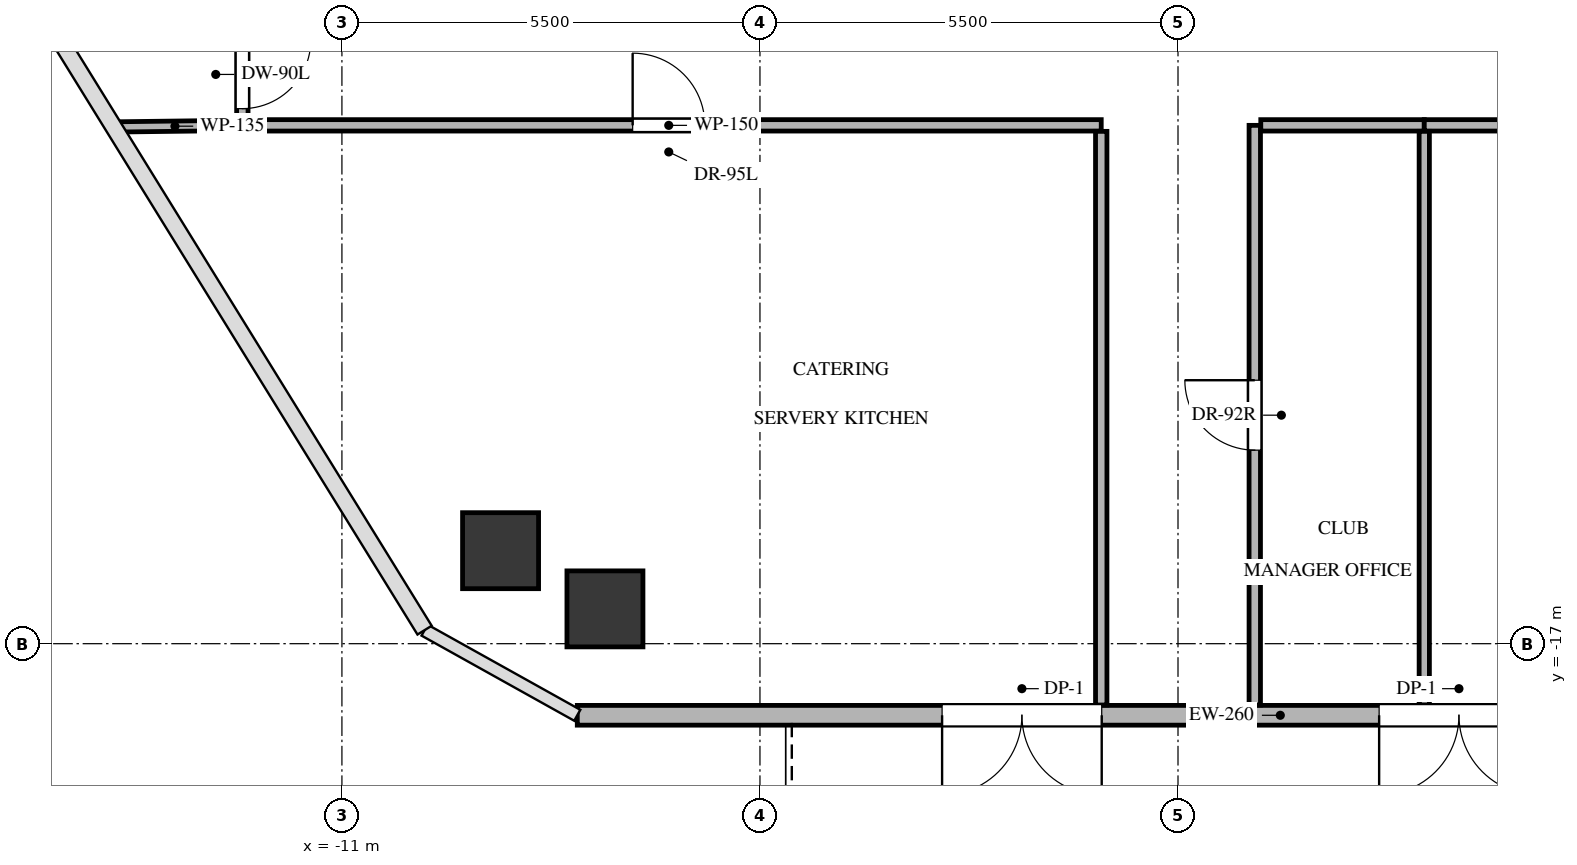
"""IFC4 building model, lengths in metres.
Left out: names, types, materials, properties, quantities, classifications, styles, units other than length and angle.
Written with IfcOpenShell. Run it as: python <this file> out.ifc"""

import sys

from ifc_helpers import new_model, si_unit, direction, frame, frame_2d, origin, origin_2d, place, context, subcontext, project, spatial, rectangle, extrude, source, transform, mapped, element, fill, save


model = new_model("IFC4")
c1 = context("Model", 3, precision=1e-05, world=origin(), true_north=direction((0.0, 1.0)))
c2 = subcontext(c1, "Body", "Model", "MODEL_VIEW")
j1 = project(units=[si_unit("LENGTHUNIT", "METRE"), si_unit("PLANEANGLEUNIT", "RADIAN")], contexts=[c1])
p1 = place(None, origin())
s1 = spatial("IfcSite", under=j1, at=p1, CompositionType="ELEMENT")
p2 = place(p1, origin())
s2 = spatial("IfcBuilding", under=s1, at=p2, CompositionType="ELEMENT")
p3 = place(p2, frame((0.0, 0.0, 162.6)))
s3 = spatial("IfcBuildingStorey", under=s2, at=p3, CompositionType="ELEMENT", Elevation=162.6)
m1 = source(origin(), c2, "Body", "SweptSolid", [
    extrude(rectangle(XDim=1.0, YDim=1.0, at=origin_2d()), origin(), (0.0, 0.0, 1.0), 4.68),
])
for number, where, z_axis, x_axis in (
    (1, (-8.913, -15.776, -0.32), (0.0, 0.0, 1.0), (1.0, 0.0, 0.0)),
    (2, (-7.54, -16.542, -0.32), (0.0, 0.0, 1.0), (1.0, 0.0, 0.0)),
):
    element("IfcColumn", number, at=place(p3, frame(where, z_axis=z_axis, x_axis=x_axis)), inside=s3, PredefinedType="COLUMN", context=c2, shape_type="MappedRepresentation", body=[
        mapped(m1, transform((0.0, 0.0, 0.0), x_axis=(1.0, 0.0, 0.0), y_axis=(0.0, 1.0, 0.0), z_axis=(0.0, 0.0, 1.0), scale=1.0)),
    ])
p4 = place(p3, frame((10.595, -17.942, 0.0), z_axis=(0.0, 0.0, 1.0), x_axis=(-1.0, 0.0, 0.0)))
e3 = element("IfcWall", 3, at=p4, inside=s3, PredefinedType="SOLIDWALL", context=c2, shape_type="SweptSolid", body=[
    extrude(rectangle(XDim=18.499, YDim=0.26, at=frame_2d((9.249, 0.0))), origin(), (0.0, 0.0, 1.0), 4.36),
])
p5 = place(p4, frame((5.849, 0.0, 0.0)))
e4 = element("IfcOpeningElement", 4, at=p5, cuts=e3, PredefinedType="OPENING", context=c2, shape_type="SweptSolid", body=[
    extrude(rectangle(XDim=2.1, YDim=2.4, at=frame_2d((1.05, 1.2))), frame((0.0, 0.14, 0.0), z_axis=(0.0, -1.0, 0.0), x_axis=(1.0, 0.0, 0.0)), (0.0, 0.0, 1.0), 0.28),
])
p6 = place(p4, frame((11.599, 0.0, 0.0)))
e5 = element("IfcOpeningElement", 5, at=p6, cuts=e3, PredefinedType="OPENING", context=c2, shape_type="SweptSolid", body=[
    extrude(rectangle(XDim=2.1, YDim=2.4, at=frame_2d((1.05, 1.2))), frame((0.0, 0.14, 0.0), z_axis=(0.0, -1.0, 0.0), x_axis=(1.0, 0.0, 0.0)), (0.0, 0.0, 1.0), 0.28),
])
p7 = place(p3, frame((-12.39, -10.18, 0.0), z_axis=(0.0, 0.0, 1.0), x_axis=(1.0, 0.0, 0.0)))
e6 = element("IfcWall", 6, at=p7, inside=s3, PredefinedType="PARTITIONING", context=c2, shape_type="SweptSolid", body=[
    extrude(rectangle(XDim=11.38, YDim=0.15, at=frame_2d((5.69, 0.0))), origin(), (0.0, 0.0, 1.0), 3.542),
])
p8 = place(p7, frame((5.215, 0.0, 0.0)))
e7 = element("IfcOpeningElement", 7, at=p8, cuts=e6, PredefinedType="OPENING", context=c2, shape_type="SweptSolid", body=[
    extrude(rectangle(XDim=0.95, YDim=2.1, at=frame_2d((0.475, 1.05))), frame((0.0, 0.085, 0.0), z_axis=(0.0, -1.0, 0.0), x_axis=(1.0, 0.0, 0.0)), (0.0, 0.0, 1.0), 0.17),
])
p9 = place(p3, frame((-1.01, -10.259, 0.0), z_axis=(0.0, 0.0, 1.0), x_axis=(0.0, -1.0, 0.0)))
e8 = element("IfcWall", 8, at=p9, inside=s3, PredefinedType="PARTITIONING", context=c2, shape_type="SweptSolid", body=[
    extrude(rectangle(XDim=7.548, YDim=0.15, at=frame_2d((3.774, 0.0))), origin(), (0.0, 0.0, 1.0), 3.699),
])
p10 = place(p3, frame((1.01, -17.807, 0.0), z_axis=(0.0, 0.0, 1.0), x_axis=(0.0, 1.0, 0.0)))
e9 = element("IfcWall", 9, at=p10, inside=s3, PredefinedType="PARTITIONING", context=c2, shape_type="SweptSolid", body=[
    extrude(rectangle(XDim=7.627, YDim=0.15, at=frame_2d((3.813, 0.0))), origin(), (0.0, 0.0, 1.0), 3.699),
])
p11 = place(p10, frame((3.354, 0.0, 0.0)))
e10 = element("IfcOpeningElement", 10, at=p11, cuts=e9, PredefinedType="OPENING", context=c2, shape_type="SweptSolid", body=[
    extrude(rectangle(XDim=0.92, YDim=2.1, at=frame_2d((0.46, 1.05))), frame((0.0, 0.085, 0.0), z_axis=(0.0, -1.0, 0.0), x_axis=(1.0, 0.0, 0.0)), (0.0, 0.0, 1.0), 0.17),
])
p12 = place(p3, frame((1.089, -10.18, 0.0), z_axis=(0.0, 0.0, 1.0), x_axis=(1.0, 0.0, 0.0)))
e11 = element("IfcWall", 11, at=p12, inside=s3, PredefinedType="PARTITIONING", context=c2, shape_type="SweptSolid", body=[
    extrude(rectangle(XDim=2.151, YDim=0.15, at=frame_2d((1.075, 0.0))), origin(), (0.0, 0.0, 1.0), 3.908),
])
p13 = place(p3, frame((3.24, -10.18, 0.0), z_axis=(0.0, 0.0, 1.0), x_axis=(1.0, 0.0, 0.0)))
e12 = element("IfcWall", 12, at=p13, inside=s3, PredefinedType="PARTITIONING", context=c2, shape_type="SweptSolid", body=[
    extrude(rectangle(XDim=9.02, YDim=0.15, at=frame_2d((4.51, 0.0))), origin(), (0.0, 0.0, 1.0), 3.542),
])
p14 = place(p13, frame((4.035, 0.0, 0.0)))
e13 = element("IfcOpeningElement", 13, at=p14, cuts=e12, PredefinedType="OPENING", context=c2, shape_type="SweptSolid", body=[
    extrude(rectangle(XDim=0.95, YDim=2.1, at=frame_2d((0.475, 1.05))), frame((0.0, 0.085, 0.0), z_axis=(0.0, -1.0, 0.0), x_axis=(1.0, 0.0, 0.0)), (0.0, 0.0, 1.0), 0.17),
])
p15 = place(p3, frame((-12.31, -8.919, 0.0), z_axis=(0.0, 0.0, 1.0), x_axis=(0.0, -1.0, 0.0)))
e14 = element("IfcWall", 14, at=p15, inside=s3, PredefinedType="PARTITIONING", context=c2, shape_type="SweptSolid", body=[
    extrude(rectangle(XDim=1.182, YDim=0.15, at=frame_2d((0.591, 0.0))), origin(), (0.0, 0.0, 1.0), 3.699),
])
p16 = place(p15, frame((0.141, 0.0, 0.0)))
e15 = element("IfcOpeningElement", 15, at=p16, cuts=e14, PredefinedType="OPENING", context=c2, shape_type="SweptSolid", body=[
    extrude(rectangle(XDim=0.9, YDim=2.05, at=frame_2d((0.45, 1.025))), frame((0.0, 0.085, 0.0), z_axis=(0.0, -1.0, 0.0), x_axis=(1.0, 0.0, 0.0)), (0.0, 0.0, 1.0), 0.17),
])
p17 = place(p3, frame((-14.004, -10.201, 0.0), z_axis=(0.0, 0.0, 1.0), x_axis=(0.999923084603, 0.012402615782, 0.0)))
e16 = element("IfcWall", 16, at=p17, inside=s3, PredefinedType="PARTITIONING", context=c2, shape_type="SweptSolid", body=[
    extrude(rectangle(XDim=1.614, YDim=0.135, at=frame_2d((0.807, 0.0))), origin(), (0.0, 0.0, 1.0), 3.699),
])
p18 = place(p3, frame((3.24, -10.259, 0.0), z_axis=(0.0, 0.0, 1.0), x_axis=(0.0, -1.0, 0.0)))
e17 = element("IfcWall", 17, at=p18, inside=s3, PredefinedType="PARTITIONING", context=c2, shape_type="SweptSolid", body=[
    extrude(rectangle(XDim=7.548, YDim=0.135, at=frame_2d((3.774, 0.0))), origin(), (0.0, 0.0, 1.0), 3.699),
])
m2 = source(origin(), c2, "Body", "SweptSolid", [
    extrude(rectangle(XDim=2.1, YDim=2.4, at=frame_2d((1.05, 1.2))), frame((0.0, 0.025, 0.0), z_axis=(0.0, -1.0, 0.0), x_axis=(1.0, 0.0, 0.0)), (0.0, 0.0, 1.0), 0.05),
])
p19 = place(p5, origin())
e18 = element("IfcDoor", 18, at=p19, inside=s3, OperationType="DOUBLE_DOOR_SINGLE_SWING", PredefinedType="DOOR", context=c2, shape_type="MappedRepresentation", body=[
    mapped(m2, transform((0.0, 0.0, 0.0), x_axis=(1.0, 0.0, 0.0), y_axis=(0.0, 1.0, 0.0), z_axis=(0.0, 0.0, 1.0), scale=1.0)),
])
fill(e4, e18)
p20 = place(p6, origin())
e19 = element("IfcDoor", 19, at=p20, inside=s3, OperationType="DOUBLE_DOOR_SINGLE_SWING", PredefinedType="DOOR", context=c2, shape_type="MappedRepresentation", body=[
    mapped(m2, transform((0.0, 0.0, 0.0), x_axis=(1.0, 0.0, 0.0), y_axis=(0.0, 1.0, 0.0), z_axis=(0.0, 0.0, 1.0), scale=1.0)),
])
fill(e5, e19)
m3 = source(origin(), c2, "Body", "SweptSolid", [
    extrude(rectangle(XDim=0.95, YDim=2.1, at=frame_2d((0.475, 1.05))), frame((0.0, 0.025, 0.0), z_axis=(0.0, -1.0, 0.0), x_axis=(1.0, 0.0, 0.0)), (0.0, 0.0, 1.0), 0.05),
])
p21 = place(p8, origin())
e20 = element("IfcDoor", 20, at=p21, inside=s3, OperationType="SINGLE_SWING_LEFT", PredefinedType="DOOR", context=c2, shape_type="MappedRepresentation", body=[
    mapped(m3, transform((0.0, 0.0, 0.0), x_axis=(1.0, 0.0, 0.0), y_axis=(0.0, 1.0, 0.0), z_axis=(0.0, 0.0, 1.0), scale=1.0)),
])
fill(e7, e20)
m4 = source(origin(), c2, "Body", "SweptSolid", [
    extrude(rectangle(XDim=0.92, YDim=2.1, at=frame_2d((0.46, 1.05))), frame((0.0, 0.025, 0.0), z_axis=(0.0, -1.0, 0.0), x_axis=(1.0, 0.0, 0.0)), (0.0, 0.0, 1.0), 0.05),
])
p22 = place(p11, origin())
e21 = element("IfcDoor", 21, at=p22, inside=s3, OperationType="SINGLE_SWING_RIGHT", PredefinedType="DOOR", context=c2, shape_type="MappedRepresentation", body=[
    mapped(m4, transform((0.0, 0.0, 0.0), x_axis=(1.0, 0.0, 0.0), y_axis=(0.0, 1.0, 0.0), z_axis=(0.0, 0.0, 1.0), scale=1.0)),
])
fill(e10, e21)
m5 = source(origin(), c2, "Body", "SweptSolid", [
    extrude(rectangle(XDim=0.9, YDim=2.05, at=frame_2d((0.45, 1.025))), frame((0.0, 0.025, 0.0), z_axis=(0.0, -1.0, 0.0), x_axis=(1.0, 0.0, 0.0)), (0.0, 0.0, 1.0), 0.05),
])
p23 = place(p16, origin())
e22 = element("IfcDoor", 22, at=p23, inside=s3, OperationType="SINGLE_SWING_LEFT", PredefinedType="DOOR", context=c2, shape_type="MappedRepresentation", body=[
    mapped(m5, transform((0.0, 0.0, 0.0), x_axis=(1.0, 0.0, 0.0), y_axis=(0.0, 1.0, 0.0), z_axis=(0.0, 0.0, 1.0), scale=1.0)),
])
fill(e15, e22)
save(model, sys.argv[1])
